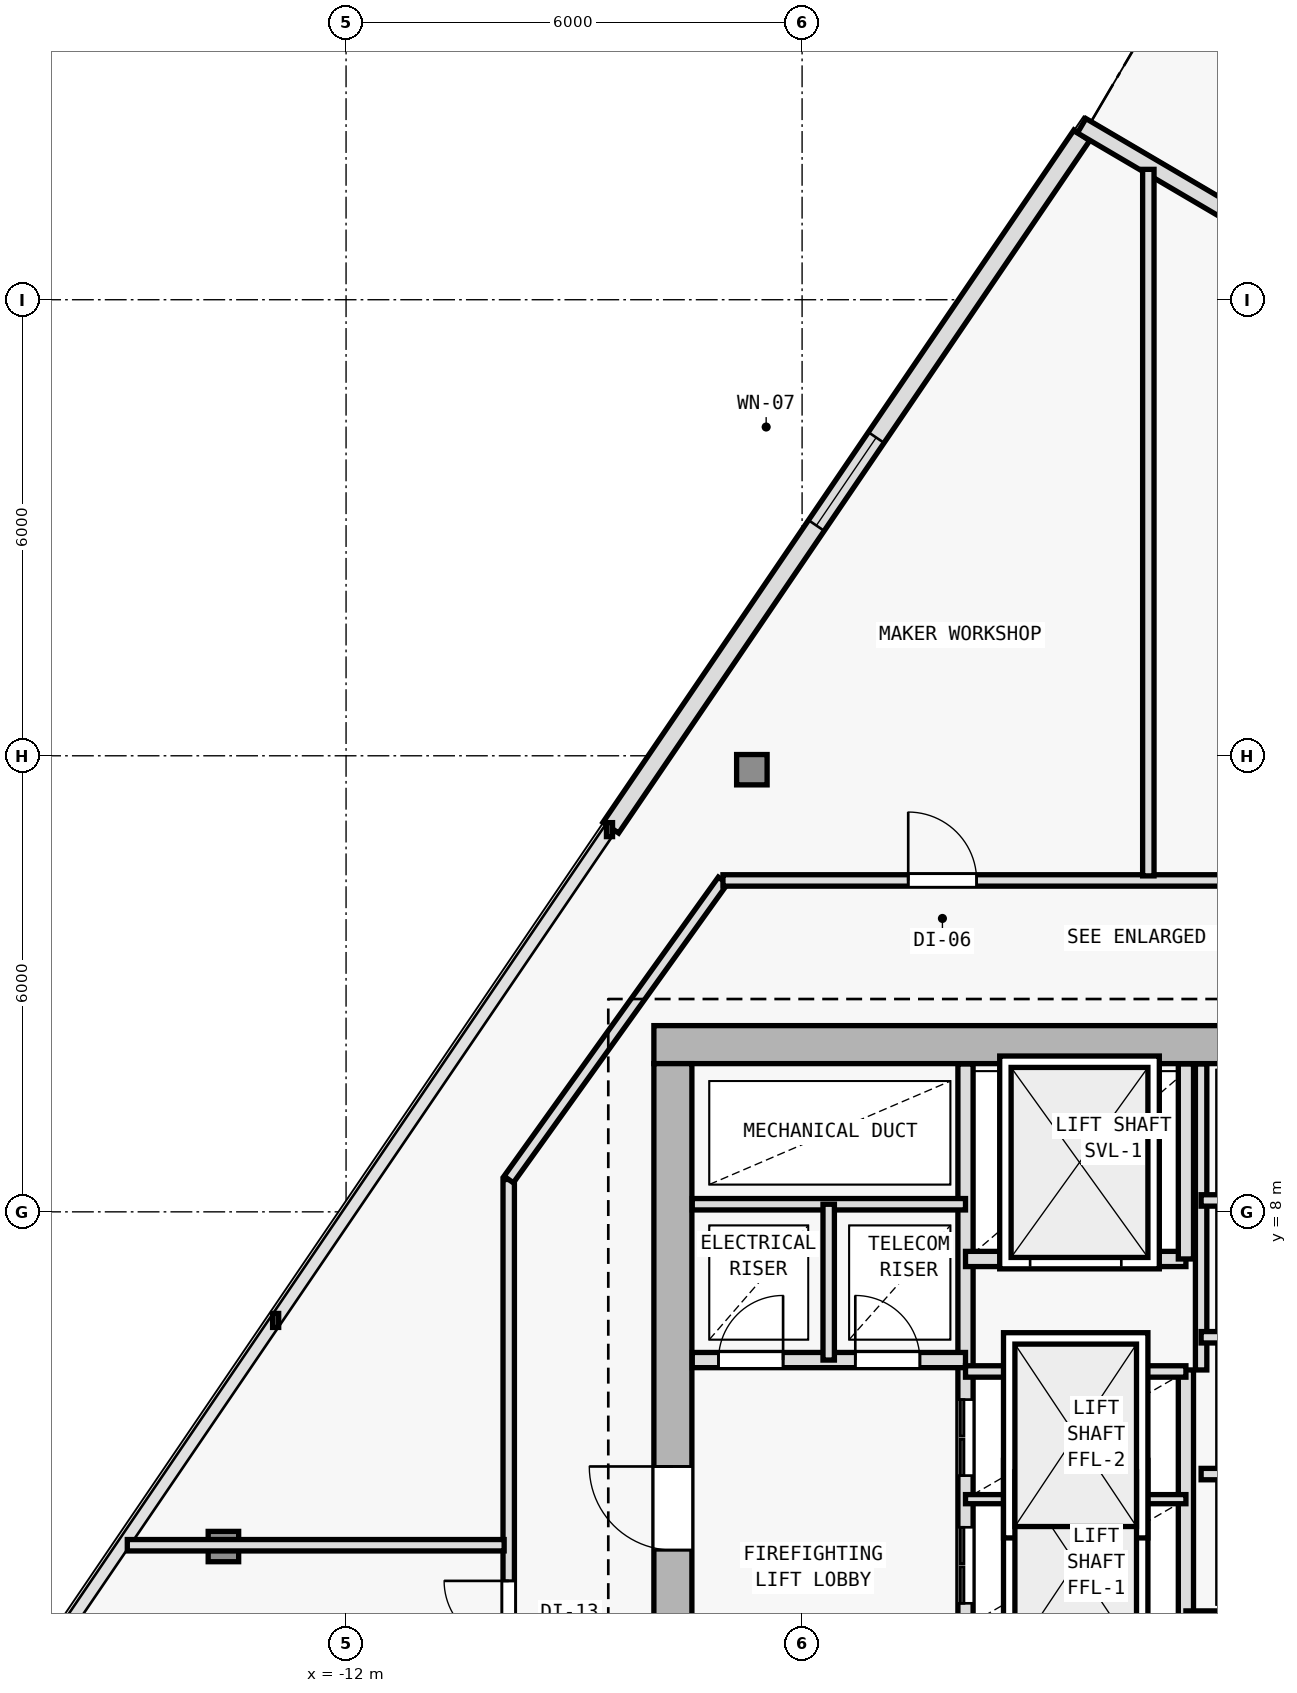
"""IFC4 building model, lengths in metres.
Left out: names, types, materials, properties, quantities, classifications, styles, units other than length and angle.
Written with IfcOpenShell. Run it as: python <this file> out.ifc"""

import sys

from ifc_helpers import new_model, si_unit, direction, frame, frame_2d, origin, origin_2d, place, context, subcontext, project, spatial, rectangle, i_section, extrude, element, fill, save


model = new_model("IFC4")
c1 = context("Model", 3, precision=1e-05, world=origin(), true_north=direction((0.0, 1.0)))
c2 = subcontext(c1, "Body", "Model", "MODEL_VIEW")
j1 = project(units=[si_unit("LENGTHUNIT", "METRE"), si_unit("PLANEANGLEUNIT", "RADIAN")], contexts=[c1])
p1 = place(None, origin())
s1 = spatial("IfcSite", under=j1, at=p1, CompositionType="ELEMENT")
p2 = place(p1, origin())
s2 = spatial("IfcBuilding", under=s1, at=p2, CompositionType="ELEMENT")
p3 = place(p2, frame((0.0, 0.0, 181.8)))
s3 = spatial("IfcBuildingStorey", under=s2, at=p3, CompositionType="ELEMENT", Elevation=181.8)
p4 = place(p3, frame((-7.7, 10.2, 0.0), z_axis=(0.0, 0.0, 1.0), x_axis=(1.0, 0.0, 0.0)))
e1 = element("IfcColumn", 1, at=p4, inside=s3, PredefinedType="COLUMN", context=c2, shape_type="SweptSolid", body=[
    extrude(i_section(OverallWidth=0.404, OverallDepth=0.407, WebThickness=0.017, FlangeThickness=0.028, FilletRadius=0.015, at=origin_2d()), origin(), (0.0, 0.0, 1.0), 3.6),
])
p5 = place(p3, frame((-6.661, 13.817, 0.005), z_axis=(0.008774547672, -0.002516730728, 0.999958335822), x_axis=(0.275705143097, 0.961242255662, 0.0)))
e2 = element("IfcColumn", 2, at=p5, inside=s3, PredefinedType="COLUMN", context=c2, shape_type="SweptSolid", body=[
    extrude(i_section(OverallWidth=0.401, OverallDepth=0.399, WebThickness=0.016, FlangeThickness=0.025, FilletRadius=0.015, at=origin_2d()), origin(), (0.0, 0.0, 1.0), 3.589),
])
p6 = place(p3, frame((-13.614, 3.597, 0.005), z_axis=(0.01700241672, 0.009521353363, 0.999810112799), x_axis=(-0.488603368932, 0.87250601595, 0.0)))
e3 = element("IfcColumn", 3, at=p6, inside=s3, PredefinedType="COLUMN", context=c2, shape_type="SweptSolid", body=[
    extrude(i_section(OverallWidth=0.401, OverallDepth=0.399, WebThickness=0.016, FlangeThickness=0.025, FilletRadius=0.015, at=origin_2d()), origin(), (0.0, 0.0, 1.0), 3.59),
])
p7 = place(p3, frame((-8.517, 13.053, 0.0), z_axis=(0.0, 0.0, 1.0), x_axis=(0.562463961516, 0.826821801838, 0.0)))
e4 = element("IfcWall", 4, at=p7, inside=s3, PredefinedType="SOLIDWALL", context=c2, shape_type="SweptSolid", body=[
    extrude(rectangle(XDim=11.018, YDim=0.25, at=frame_2d((5.509, 0.0))), origin(), (0.0, 0.0, 1.0), 3.28),
])
p8 = place(p7, frame((4.809, 0.0, 0.62)))
e5 = element("IfcOpeningElement", 5, at=p8, cuts=e4, PredefinedType="OPENING", context=c2, shape_type="SweptSolid", body=[
    extrude(rectangle(XDim=1.4, YDim=2.0, at=frame_2d((0.7, 1.0))), frame((0.0, 0.135, 0.0), z_axis=(0.0, -1.0, 0.0), x_axis=(1.0, 0.0, 0.0)), (0.0, 0.0, 1.0), 0.27),
])
p9 = place(p3, frame((-2.322, 22.289, 0.0), z_axis=(0.0, 0.0, 1.0), x_axis=(0.862111523483, -0.506718581738, 0.0)))
e6 = element("IfcWall", 6, at=p9, inside=s3, PredefinedType="SOLIDWALL", context=c2, shape_type="SweptSolid", body=[
    extrude(rectangle(XDim=4.777, YDim=0.22, at=frame_2d((2.389, 0.0))), origin(), (0.0, 0.0, 1.0), 3.28),
])
p10 = place(p9, frame((2.714, 0.0, 0.0)))
e7 = element("IfcOpeningElement", 7, at=p10, cuts=e6, PredefinedType="OPENING", context=c2, shape_type="SweptSolid", body=[
    extrude(rectangle(XDim=1.05, YDim=2.15, at=frame_2d((0.525, 1.075))), frame((0.0, 0.12, 0.0), z_axis=(0.0, -1.0, 0.0), x_axis=(1.0, 0.0, 0.0)), (0.0, 0.0, 1.0), 0.24),
])
p11 = place(p3, frame((7.95, 10.2, 0.0), z_axis=(0.0, 0.0, 1.0), x_axis=(-1.0, 0.0, 0.0)))
e8 = element("IfcWall", 8, at=p11, inside=s3, PredefinedType="SHEAR", context=c2, shape_type="SweptSolid", body=[
    extrude(rectangle(XDim=15.9, YDim=0.5, at=frame_2d((7.95, 0.0))), origin(), (0.0, 0.0, 1.0), 3.28),
])
p12 = place(p11, frame((4.4, 0.0, 0.0)))
e9 = element("IfcOpeningElement", 9, at=p12, cuts=e8, PredefinedType="OPENING", context=c2, shape_type="SweptSolid", body=[
    extrude(rectangle(XDim=1.1, YDim=2.15, at=frame_2d((0.55, 1.075))), frame((0.0, 0.26, 0.0), z_axis=(0.0, -1.0, 0.0), x_axis=(1.0, 0.0, 0.0)), (0.0, 0.0, 1.0), 0.52),
])
p13 = place(p3, frame((-7.7, -9.15, 0.0), z_axis=(0.0, 0.0, 1.0), x_axis=(0.0, 1.0, 0.0)))
e10 = element("IfcWall", 10, at=p13, inside=s3, PredefinedType="SHEAR", context=c2, shape_type="SweptSolid", body=[
    extrude(rectangle(XDim=19.1, YDim=0.5, at=frame_2d((9.55, 0.0))), origin(), (0.0, 0.0, 1.0), 3.28),
])
p14 = place(p13, frame((12.7, 0.0, 0.0)))
e11 = element("IfcOpeningElement", 11, at=p14, cuts=e10, PredefinedType="OPENING", context=c2, shape_type="SweptSolid", body=[
    extrude(rectangle(XDim=1.1, YDim=2.15, at=frame_2d((0.55, 1.075))), frame((0.0, 0.26, 0.0), z_axis=(0.0, -1.0, 0.0), x_axis=(1.0, 0.0, 0.0)), (0.0, 0.0, 1.0), 0.52),
])
p15 = place(p3, frame((-3.85, 1.35, 0.0), z_axis=(0.0, 0.0, 1.0), x_axis=(0.0, 1.0, 0.0)))
e12 = element("IfcWall", 12, at=p15, inside=s3, PredefinedType="SOLIDWALL", context=c2, shape_type="SweptSolid", body=[
    extrude(rectangle(XDim=8.595, YDim=0.2, at=frame_2d((4.297, 0.0))), origin(), (0.0, 0.0, 1.0), 3.28),
])
p16 = place(p15, frame((1.5, 0.0, 0.0)))
e13 = element("IfcOpeningElement", 13, at=p16, cuts=e12, PredefinedType="OPENING", context=c2, shape_type="SweptSolid", body=[
    extrude(rectangle(XDim=1.0, YDim=2.15, at=frame_2d((0.5, 1.075))), frame((0.0, 0.11, 0.0), z_axis=(0.0, -1.0, 0.0), x_axis=(1.0, 0.0, 0.0)), (0.0, 0.0, 1.0), 0.22),
])
p17 = place(p15, frame((3.18, 0.0, 0.0)))
e14 = element("IfcOpeningElement", 14, at=p17, cuts=e12, PredefinedType="OPENING", context=c2, shape_type="SweptSolid", body=[
    extrude(rectangle(XDim=1.0, YDim=2.15, at=frame_2d((0.5, 1.075))), frame((0.0, 0.11, 0.0), z_axis=(0.0, -1.0, 0.0), x_axis=(1.0, 0.0, 0.0)), (0.0, 0.0, 1.0), 0.22),
])
p18 = place(p3, frame((-7.445, 6.05, 0.0), z_axis=(0.0, 0.0, 1.0), x_axis=(1.0, 0.0, 0.0)))
e15 = element("IfcWall", 15, at=p18, inside=s3, PredefinedType="SOLIDWALL", context=c2, shape_type="SweptSolid", body=[
    extrude(rectangle(XDim=3.595, YDim=0.2, at=frame_2d((1.797, 0.0))), origin(), (0.0, 0.0, 1.0), 3.28),
])
p19 = place(p18, frame((0.345, 0.0, 0.0)))
e16 = element("IfcOpeningElement", 16, at=p19, cuts=e15, PredefinedType="OPENING", context=c2, shape_type="SweptSolid", body=[
    extrude(rectangle(XDim=0.85, YDim=2.1, at=frame_2d((0.425, 1.05))), frame((0.0, 0.11, 0.0), z_axis=(0.0, -1.0, 0.0), x_axis=(1.0, 0.0, 0.0)), (0.0, 0.0, 1.0), 0.22),
])
p20 = place(p18, frame((2.145, 0.0, 0.0)))
e17 = element("IfcOpeningElement", 17, at=p20, cuts=e15, PredefinedType="OPENING", context=c2, shape_type="SweptSolid", body=[
    extrude(rectangle(XDim=0.85, YDim=2.1, at=frame_2d((0.425, 1.05))), frame((0.0, 0.11, 0.0), z_axis=(0.0, -1.0, 0.0), x_axis=(1.0, 0.0, 0.0)), (0.0, 0.0, 1.0), 0.22),
])
p21 = place(p3, frame((-7.445, 8.1, 0.0), z_axis=(0.0, 0.0, 1.0), x_axis=(1.0, 0.0, 0.0)))
e18 = element("IfcWall", 18, at=p21, inside=s3, PredefinedType="PARTITIONING", context=c2, shape_type="SweptSolid", body=[
    extrude(rectangle(XDim=3.595, YDim=0.15, at=frame_2d((1.797, 0.0))), origin(), (0.0, 0.0, 1.0), 3.28),
])
p22 = place(p3, frame((-5.65, 6.05, 0.0), z_axis=(0.0, 0.0, 1.0), x_axis=(0.0, 1.0, 0.0)))
e19 = element("IfcWall", 19, at=p22, inside=s3, PredefinedType="PARTITIONING", context=c2, shape_type="SweptSolid", body=[
    extrude(rectangle(XDim=2.05, YDim=0.15, at=frame_2d((1.025, 0.0))), origin(), (0.0, 0.0, 1.0), 3.28),
])
p23 = place(p3, frame((-0.95, 2.65, 0.0), z_axis=(0.0, 0.0, 1.0), x_axis=(0.0, 1.0, 0.0)))
e20 = element("IfcWall", 20, at=p23, inside=s3, PredefinedType="SOLIDWALL", context=c2, shape_type="SweptSolid", body=[
    extrude(rectangle(XDim=3.27, YDim=0.2, at=frame_2d((1.635, 0.0))), origin(), (0.0, 0.0, 1.0), 3.28),
])
p24 = place(p3, frame((-3.85, 4.22, 0.0), z_axis=(0.0, 0.0, 1.0), x_axis=(1.0, 0.0, 0.0)))
e21 = element("IfcWall", 21, at=p24, inside=s3, PredefinedType="PARTITIONING", context=c2, shape_type="SweptSolid", body=[
    extrude(rectangle(XDim=2.9, YDim=0.12, at=frame_2d((1.45, 0.0))), origin(), (0.0, 0.0, 1.0), 3.28),
])
p25 = place(p3, frame((-3.85, 5.9, 0.0), z_axis=(0.0, 0.0, 1.0), x_axis=(1.0, 0.0, 0.0)))
e22 = element("IfcWall", 22, at=p25, inside=s3, PredefinedType="PARTITIONING", context=c2, shape_type="SweptSolid", body=[
    extrude(rectangle(XDim=2.9, YDim=0.15, at=frame_2d((1.45, 0.0))), origin(), (0.0, 0.0, 1.0), 3.28),
])
p26 = place(p3, frame((-3.85, 7.38, 0.0), z_axis=(0.0, 0.0, 1.0), x_axis=(1.0, 0.0, 0.0)))
e23 = element("IfcWall", 23, at=p26, inside=s3, PredefinedType="SOLIDWALL", context=c2, shape_type="SweptSolid", body=[
    extrude(rectangle(XDim=2.9, YDim=0.2, at=frame_2d((1.45, 0.0))), origin(), (0.0, 0.0, 1.0), 3.28),
])
p27 = place(p26, frame((0.85, 0.0, 0.0)))
e24 = element("IfcOpeningElement", 24, at=p27, cuts=e23, PredefinedType="OPENING", context=c2, shape_type="SweptSolid", body=[
    extrude(rectangle(XDim=1.2, YDim=2.2, at=frame_2d((0.6, 1.1))), frame((0.0, 0.11, 0.0), z_axis=(0.0, -1.0, 0.0), x_axis=(1.0, 0.0, 0.0)), (0.0, 0.0, 1.0), 0.22),
])
p28 = place(p3, frame((-0.95, 7.38, 0.0), z_axis=(0.0, 0.0, 1.0), x_axis=(0.0, 1.0, 0.0)))
e25 = element("IfcWall", 25, at=p28, inside=s3, PredefinedType="SOLIDWALL", context=c2, shape_type="SweptSolid", body=[
    extrude(rectangle(XDim=2.565, YDim=0.2, at=frame_2d((1.283, 0.0))), origin(), (0.0, 0.0, 1.0), 3.28),
])
p29 = place(p3, frame((-0.95, 2.65, 0.0), z_axis=(0.0, 0.0, 1.0), x_axis=(1.0, 0.0, 0.0)))
e26 = element("IfcWall", 26, at=p29, inside=s3, PredefinedType="SOLIDWALL", context=c2, shape_type="SweptSolid", body=[
    extrude(rectangle(XDim=2.9, YDim=0.2, at=frame_2d((1.45, 0.0))), origin(), (0.0, 0.0, 1.0), 3.28),
])
p30 = place(p3, frame((-0.75, 5.92, 0.0), z_axis=(0.0, 0.0, 1.0), x_axis=(0.0, 1.0, 0.0)))
e27 = element("IfcWall", 27, at=p30, inside=s3, PredefinedType="PARTITIONING", context=c2, shape_type="SweptSolid", body=[
    extrude(rectangle(XDim=4.025, YDim=0.15, at=frame_2d((2.013, 0.0))), origin(), (0.0, 0.0, 1.0), 3.28),
])
for number, where, z_axis, x_axis in (
    (28, (-0.75, 4.55, 0.0), (0.0, 0.0, 1.0), (1.0, 0.0, 0.0)),
    (29, (-0.75, 6.35, 0.0), (0.0, 0.0, 1.0), (1.0, 0.0, 0.0)),
    (30, (-0.75, 8.15, 0.0), (0.0, 0.0, 1.0), (1.0, 0.0, 0.0)),
):
    element("IfcWall", number, at=place(p3, frame(where, z_axis=z_axis, x_axis=x_axis)), inside=s3, PredefinedType="PARTITIONING", context=c2, shape_type="SweptSolid", body=[
        extrude(rectangle(XDim=2.7, YDim=0.15, at=frame_2d((1.35, 0.0))), origin(), (0.0, 0.0, 1.0), 3.28),
    ])
p31 = place(p3, frame((-9.86, -11.56, 0.0), z_axis=(0.0, 0.0, 1.0), x_axis=(0.0, 1.0, 0.0)))
e31 = element("IfcWall", 31, at=p31, inside=s3, PredefinedType="PARTITIONING", context=c2, shape_type="SweptSolid", body=[
    extrude(rectangle(XDim=19.986, YDim=0.15, at=frame_2d((9.993, 0.0))), origin(), (0.0, 0.0, 1.0), 2.755),
])
p32 = place(p31, frame((9.026, 0.0, 0.0)))
e32 = element("IfcOpeningElement", 32, at=p32, cuts=e31, PredefinedType="OPENING", context=c2, shape_type="SweptSolid", body=[
    extrude(rectangle(XDim=0.9, YDim=2.1, at=frame_2d((0.45, 1.05))), frame((0.0, 0.085, 0.0), z_axis=(0.0, -1.0, 0.0), x_axis=(1.0, 0.0, 0.0)), (0.0, 0.0, 1.0), 0.17),
])
p33 = place(p31, frame((7.096, 0.0, 0.0)))
e33 = element("IfcOpeningElement", 33, at=p33, cuts=e31, PredefinedType="OPENING", context=c2, shape_type="SweptSolid", body=[
    extrude(rectangle(XDim=0.85, YDim=2.1, at=frame_2d((0.425, 1.05))), frame((0.0, 0.085, 0.0), z_axis=(0.0, -1.0, 0.0), x_axis=(1.0, 0.0, 0.0)), (0.0, 0.0, 1.0), 0.17),
])
p34 = place(p31, frame((5.416, 0.0, 0.0)))
e34 = element("IfcOpeningElement", 34, at=p34, cuts=e31, PredefinedType="OPENING", context=c2, shape_type="SweptSolid", body=[
    extrude(rectangle(XDim=0.85, YDim=2.1, at=frame_2d((0.425, 1.05))), frame((0.0, 0.085, 0.0), z_axis=(0.0, -1.0, 0.0), x_axis=(1.0, 0.0, 0.0)), (0.0, 0.0, 1.0), 0.17),
])
p35 = place(p31, frame((2.127, 0.0, 0.0)))
e35 = element("IfcOpeningElement", 35, at=p35, cuts=e31, PredefinedType="OPENING", context=c2, shape_type="SweptSolid", body=[
    extrude(rectangle(XDim=0.9, YDim=2.1, at=frame_2d((0.45, 1.05))), frame((0.0, 0.085, 0.0), z_axis=(0.0, -1.0, 0.0), x_axis=(1.0, 0.0, 0.0)), (0.0, 0.0, 1.0), 0.17),
])
p36 = place(p31, frame((13.855, 0.0, 0.0)))
e36 = element("IfcOpeningElement", 36, at=p36, cuts=e31, PredefinedType="OPENING", context=c2, shape_type="SweptSolid", body=[
    extrude(rectangle(XDim=0.85, YDim=2.1, at=frame_2d((0.425, 1.05))), frame((0.0, 0.085, 0.0), z_axis=(0.0, -1.0, 0.0), x_axis=(1.0, 0.0, 0.0)), (0.0, 0.0, 1.0), 0.17),
])
p37 = place(p31, frame((11.576, 0.0, 0.0)))
e37 = element("IfcOpeningElement", 37, at=p37, cuts=e31, PredefinedType="OPENING", context=c2, shape_type="SweptSolid", body=[
    extrude(rectangle(XDim=0.9, YDim=2.1, at=frame_2d((0.45, 1.05))), frame((0.0, 0.085, 0.0), z_axis=(0.0, -1.0, 0.0), x_axis=(1.0, 0.0, 0.0)), (0.0, 0.0, 1.0), 0.17),
])
p38 = place(p3, frame((-9.86, 8.426, 0.0), z_axis=(0.0, 0.0, 1.0), x_axis=(0.582449511476, 0.812866881218, 0.0)))
e38 = element("IfcWall", 38, at=p38, inside=s3, PredefinedType="PARTITIONING", context=c2, shape_type="SweptSolid", body=[
    extrude(rectangle(XDim=4.84, YDim=0.15, at=frame_2d((2.42, 0.0))), origin(), (0.0, 0.0, 1.0), 2.935),
])
p39 = place(p3, frame((-7.041, 12.36, 0.0), z_axis=(0.0, 0.0, 1.0), x_axis=(1.0, 0.0, 0.0)))
e39 = element("IfcWall", 39, at=p39, inside=s3, PredefinedType="PARTITIONING", context=c2, shape_type="SweptSolid", body=[
    extrude(rectangle(XDim=14.064, YDim=0.15, at=frame_2d((7.032, 0.0))), origin(), (0.0, 0.0, 1.0), 2.935),
])
p40 = place(p39, frame((9.292, 0.0, 0.0)))
e40 = element("IfcOpeningElement", 40, at=p40, cuts=e39, PredefinedType="OPENING", context=c2, shape_type="SweptSolid", body=[
    extrude(rectangle(XDim=0.9, YDim=2.1, at=frame_2d((0.45, 1.05))), frame((0.0, 0.085, 0.0), z_axis=(0.0, -1.0, 0.0), x_axis=(1.0, 0.0, 0.0)), (0.0, 0.0, 1.0), 0.17),
])
p41 = place(p39, frame((2.438, 0.0, 0.0)))
e41 = element("IfcOpeningElement", 41, at=p41, cuts=e39, PredefinedType="OPENING", context=c2, shape_type="SweptSolid", body=[
    extrude(rectangle(XDim=0.9, YDim=2.1, at=frame_2d((0.45, 1.05))), frame((0.0, 0.085, 0.0), z_axis=(0.0, -1.0, 0.0), x_axis=(1.0, 0.0, 0.0)), (0.0, 0.0, 1.0), 0.17),
])
p42 = place(p3, frame((-9.92, 3.614, 0.0), z_axis=(0.0, 0.0, 1.0), x_axis=(-1.0, 0.0, 0.0)))
e42 = element("IfcWall", 42, at=p42, inside=s3, PredefinedType="PARTITIONING", context=c2, shape_type="SweptSolid", body=[
    extrude(rectangle(XDim=4.958, YDim=0.15, at=frame_2d((2.479, 0.0))), origin(), (0.0, 0.0, 1.0), 2.865),
])
p43 = place(p3, frame((-1.445, 12.42, 0.0), z_axis=(0.0, 0.0, 1.0), x_axis=(0.0, 1.0, 0.0)))
e43 = element("IfcWall", 43, at=p43, inside=s3, PredefinedType="PARTITIONING", context=c2, shape_type="SweptSolid", body=[
    extrude(rectangle(XDim=9.295, YDim=0.15, at=frame_2d((4.647, 0.0))), origin(), (0.0, 0.0, 1.0), 2.865),
])
p44 = place(p8, origin())
e44 = element("IfcWindow", 44, at=p44, inside=s3, PartitioningType="SINGLE_PANEL", PredefinedType="WINDOW", context=c2, shape_type="SweptSolid", body=[
    extrude(rectangle(XDim=1.4, YDim=2.0, at=frame_2d((0.7, 1.0))), frame((0.0, 0.03, 0.0), z_axis=(0.0, -1.0, 0.0), x_axis=(1.0, 0.0, 0.0)), (0.0, 0.0, 1.0), 0.06),
])
fill(e5, e44)
p45 = place(p14, origin())
e45 = element("IfcDoor", 45, at=p45, inside=s3, OperationType="SINGLE_SWING_RIGHT", PredefinedType="DOOR", context=c2, shape_type="SweptSolid", body=[
    extrude(rectangle(XDim=1.1, YDim=2.15, at=frame_2d((0.55, 1.075))), frame((0.0, 0.025, 0.0), z_axis=(0.0, -1.0, 0.0), x_axis=(1.0, 0.0, 0.0)), (0.0, 0.0, 1.0), 0.05),
])
fill(e11, e45)
p46 = place(p19, origin())
e46 = element("IfcDoor", 46, at=p46, inside=s3, OperationType="SINGLE_SWING_RIGHT", PredefinedType="DOOR", context=c2, shape_type="SweptSolid", body=[
    extrude(rectangle(XDim=0.85, YDim=2.1, at=frame_2d((0.425, 1.05))), frame((0.0, 0.025, 0.0), z_axis=(0.0, -1.0, 0.0), x_axis=(1.0, 0.0, 0.0)), (0.0, 0.0, 1.0), 0.05),
])
fill(e16, e46)
p47 = place(p20, origin())
e47 = element("IfcDoor", 47, at=p47, inside=s3, OperationType="SINGLE_SWING_LEFT", PredefinedType="DOOR", context=c2, shape_type="SweptSolid", body=[
    extrude(rectangle(XDim=0.85, YDim=2.1, at=frame_2d((0.425, 1.05))), frame((0.0, 0.025, 0.0), z_axis=(0.0, -1.0, 0.0), x_axis=(1.0, 0.0, 0.0)), (0.0, 0.0, 1.0), 0.05),
])
fill(e17, e47)
p48 = place(p27, origin())
e48 = element("IfcDoor", 48, at=p48, inside=s3, OperationType="DOUBLE_DOOR_SLIDING", PredefinedType="DOOR", context=c2, shape_type="SweptSolid", body=[
    extrude(rectangle(XDim=1.2, YDim=2.2, at=frame_2d((0.6, 1.1))), frame((0.0, 0.025, 0.0), z_axis=(0.0, -1.0, 0.0), x_axis=(1.0, 0.0, 0.0)), (0.0, 0.0, 1.0), 0.05),
])
fill(e24, e48)
p49 = place(p16, origin())
e49 = element("IfcDoor", 49, at=p49, inside=s3, OperationType="DOUBLE_DOOR_SLIDING", PredefinedType="DOOR", context=c2, shape_type="SweptSolid", body=[
    extrude(rectangle(XDim=1.0, YDim=2.15, at=frame_2d((0.5, 1.075))), frame((0.0, 0.025, 0.0), z_axis=(0.0, -1.0, 0.0), x_axis=(1.0, 0.0, 0.0)), (0.0, 0.0, 1.0), 0.05),
])
fill(e13, e49)
p50 = place(p17, origin())
e50 = element("IfcDoor", 50, at=p50, inside=s3, OperationType="DOUBLE_DOOR_SLIDING", PredefinedType="DOOR", context=c2, shape_type="SweptSolid", body=[
    extrude(rectangle(XDim=1.0, YDim=2.15, at=frame_2d((0.5, 1.075))), frame((0.0, 0.025, 0.0), z_axis=(0.0, -1.0, 0.0), x_axis=(1.0, 0.0, 0.0)), (0.0, 0.0, 1.0), 0.05),
])
fill(e14, e50)
p51 = place(p41, origin())
e51 = element("IfcDoor", 51, at=p51, inside=s3, OperationType="SINGLE_SWING_LEFT", PredefinedType="DOOR", context=c2, shape_type="SweptSolid", body=[
    extrude(rectangle(XDim=0.9, YDim=2.1, at=frame_2d((0.45, 1.05))), frame((0.0, 0.025, 0.0), z_axis=(0.0, -1.0, 0.0), x_axis=(1.0, 0.0, 0.0)), (0.0, 0.0, 1.0), 0.05),
])
fill(e41, e51)
p52 = place(p36, origin())
e52 = element("IfcDoor", 52, at=p52, inside=s3, OperationType="SINGLE_SWING_RIGHT", PredefinedType="DOOR", context=c2, shape_type="SweptSolid", body=[
    extrude(rectangle(XDim=0.85, YDim=2.1, at=frame_2d((0.425, 1.05))), frame((0.0, 0.025, 0.0), z_axis=(0.0, -1.0, 0.0), x_axis=(1.0, 0.0, 0.0)), (0.0, 0.0, 1.0), 0.05),
])
fill(e36, e52)
save(model, sys.argv[1])
